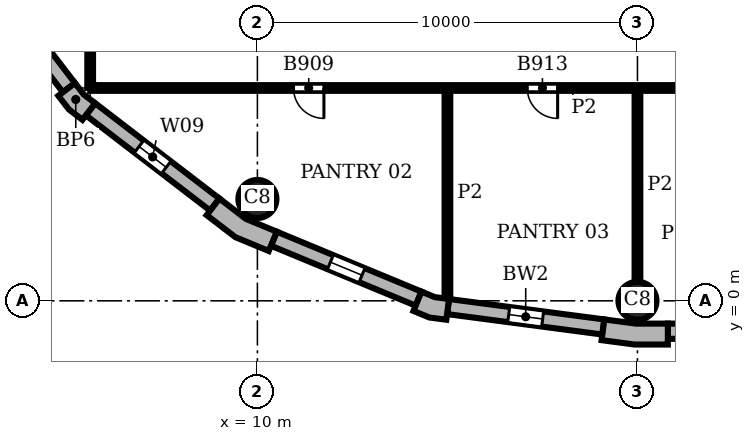
"""IFC4 building model, lengths in metres.
Left out: names, types, materials, properties, quantities, classifications, styles, units other than length and angle.
Written with IfcOpenShell. Run it as: python <this file> out.ifc"""

import sys

from ifc_helpers import new_model, si_unit, direction, frame, frame_2d, origin, origin_2d, place, context, subcontext, project, spatial, polyline, rectangle, circle, outline, extrude, element, fill, save


model = new_model("IFC4")
c1 = context("Model", 3, precision=1e-05, world=origin(), true_north=direction((0.0, 1.0)))
c2 = subcontext(c1, "Body", "Model", "MODEL_VIEW")
j1 = project(units=[si_unit("LENGTHUNIT", "METRE"), si_unit("PLANEANGLEUNIT", "RADIAN")], contexts=[c1])
p1 = place(None, origin())
s1 = spatial("IfcSite", under=j1, at=p1, CompositionType="ELEMENT")
p2 = place(p1, origin())
s2 = spatial("IfcBuilding", under=s1, at=p2, CompositionType="ELEMENT")
p3 = place(p2, frame((0.0, 0.0, 233.1)))
s3 = spatial("IfcBuildingStorey", under=s2, at=p3, CompositionType="ELEMENT", Elevation=233.1)
for number, where, z_axis, x_axis in (
    (1, (20.0, 0.0, 0.0), (0.0, 0.0, 1.0), (1.0, 0.0, 0.0)),
    (2, (10.0, 2.679, 0.0), (0.0, 0.0, 1.0), (1.0, 0.0, 0.0)),
):
    element("IfcColumn", number, at=place(p3, frame(where, z_axis=z_axis, x_axis=x_axis)), inside=s3, PredefinedType="COLUMN", context=c2, shape_type="SweptSolid", body=[
        extrude(circle(Radius=0.5, at=origin_2d()), origin(), (0.0, 0.0, 1.0), 3.9),
    ])
p4 = place(p3, origin())
e3 = element("IfcWall", 3, at=p4, inside=s3, PredefinedType="SOLIDWALL", context=c2, shape_type="SweptSolid", body=[
    extrude(outline(polyline([(19.076, -0.887), (19.057, -1.036), (19.925, -1.15), (20.8, -1.15), (20.8, -1.0), (20.8, -0.6), (19.961, -0.6), (19.128, -0.49), (19.076, -0.887)])), origin(), (0.0, 0.0, 1.0), 3.9),
])
e4 = element("IfcWall", 4, at=p4, inside=s3, PredefinedType="SOLIDWALL", context=c2, shape_type="SweptSolid", body=[
    extrude(outline(polyline([(4.882, 5.487), (4.763, 5.396), (5.038, 5.038), (5.396, 4.763), (5.487, 4.882), (5.731, 5.199), (5.43, 5.43), (5.199, 5.731), (4.882, 5.487)])), origin(), (0.0, 0.0, 1.0), 3.9),
])
e5 = element("IfcWall", 5, at=p4, inside=s3, PredefinedType="SOLIDWALL", context=c2, shape_type="SweptSolid", body=[
    extrude(outline(polyline([(8.757, 2.373), (8.665, 2.254), (9.42, 1.675), (10.299, 1.311), (10.356, 1.449), (10.51, 1.819), (9.698, 2.155), (9.0, 2.69), (8.757, 2.373)])), origin(), (0.0, 0.0, 1.0), 3.9),
])
e6 = element("IfcWall", 6, at=p4, inside=s3, PredefinedType="SOLIDWALL", context=c2, shape_type="SweptSolid", body=[
    extrude(outline(polyline([(14.164, -0.128), (14.106, -0.266), (14.523, -0.439), (14.971, -0.498), (14.99, -0.349), (15.043, 0.047), (14.667, 0.097), (14.317, 0.242), (14.164, -0.128)])), origin(), (0.0, 0.0, 1.0), 3.9),
])
p5 = place(p3, frame((20.8, -0.8, 0.0), z_axis=(0.0, 0.0, 1.0), x_axis=(1.0, 0.0, 0.0)))
e7 = element("IfcWall", 7, at=p5, inside=s3, PredefinedType="SOLIDWALL", context=c2, shape_type="SweptSolid", body=[
    extrude(rectangle(XDim=38.4, YDim=0.4, at=frame_2d((19.2, 0.0))), origin(), (0.0, 0.0, 1.0), 3.9),
])
p6 = place(p5, frame((3.75, 0.0, 0.9)))
e8 = element("IfcOpeningElement", 8, at=p6, cuts=e7, PredefinedType="OPENING", context=c2, shape_type="SweptSolid", body=[
    extrude(rectangle(XDim=0.9, YDim=2.35, at=frame_2d((0.45, 1.175))), frame((0.0, 0.21, 0.0), z_axis=(0.0, -1.0, 0.0), x_axis=(1.0, 0.0, 0.0)), (0.0, 0.0, 1.0), 0.42),
])
p7 = place(p5, frame((13.75, 0.0, 0.9)))
e9 = element("IfcOpeningElement", 9, at=p7, cuts=e7, PredefinedType="OPENING", context=c2, shape_type="SweptSolid", body=[
    extrude(rectangle(XDim=0.9, YDim=2.35, at=frame_2d((0.45, 1.175))), frame((0.0, 0.21, 0.0), z_axis=(0.0, -1.0, 0.0), x_axis=(1.0, 0.0, 0.0)), (0.0, 0.0, 1.0), 0.42),
])
p8 = place(p5, frame((23.75, 0.0, 0.9)))
e10 = element("IfcOpeningElement", 10, at=p8, cuts=e7, PredefinedType="OPENING", context=c2, shape_type="SweptSolid", body=[
    extrude(rectangle(XDim=0.9, YDim=2.35, at=frame_2d((0.45, 1.175))), frame((0.0, 0.21, 0.0), z_axis=(0.0, -1.0, 0.0), x_axis=(1.0, 0.0, 0.0)), (0.0, 0.0, 1.0), 0.42),
])
p9 = place(p5, frame((33.75, 0.0, 0.9)))
e11 = element("IfcOpeningElement", 11, at=p9, cuts=e7, PredefinedType="OPENING", context=c2, shape_type="SweptSolid", body=[
    extrude(rectangle(XDim=0.9, YDim=2.35, at=frame_2d((0.45, 1.175))), frame((0.0, 0.21, 0.0), z_axis=(0.0, -1.0, 0.0), x_axis=(1.0, 0.0, 0.0)), (0.0, 0.0, 1.0), 0.42),
])
p10 = place(p3, frame((2.532, 8.878, 0.0), z_axis=(0.0, 0.0, 1.0), x_axis=(0.608759824817, -0.793354571229, 0.0)))
e12 = element("IfcWall", 12, at=p10, inside=s3, PredefinedType="SOLIDWALL", context=c2, shape_type="SweptSolid", body=[
    extrude(rectangle(XDim=4.121, YDim=0.4, at=frame_2d((2.061, 0.0))), origin(), (0.0, 0.0, 1.0), 3.9),
])
p11 = place(p10, frame((1.611, 0.0, 0.9)))
e13 = element("IfcOpeningElement", 13, at=p11, cuts=e12, PredefinedType="OPENING", context=c2, shape_type="SweptSolid", body=[
    extrude(rectangle(XDim=0.9, YDim=2.35, at=frame_2d((0.45, 1.175))), frame((0.0, 0.21, 0.0), z_axis=(0.0, -1.0, 0.0), x_axis=(1.0, 0.0, 0.0)), (0.0, 0.0, 1.0), 0.42),
])
p12 = place(p3, frame((5.609, 5.041, 0.0), z_axis=(0.0, 0.0, 1.0), x_axis=(0.793354571229, -0.608759824817, 0.0)))
e14 = element("IfcWall", 14, at=p12, inside=s3, PredefinedType="SOLIDWALL", context=c2, shape_type="SweptSolid", body=[
    extrude(rectangle(XDim=4.121, YDim=0.4, at=frame_2d((2.061, 0.0))), origin(), (0.0, 0.0, 1.0), 3.9),
])
p13 = place(p12, frame((1.611, 0.0, 0.9)))
e15 = element("IfcOpeningElement", 15, at=p13, cuts=e14, PredefinedType="OPENING", context=c2, shape_type="SweptSolid", body=[
    extrude(rectangle(XDim=0.9, YDim=2.35, at=frame_2d((0.45, 1.175))), frame((0.0, 0.21, 0.0), z_axis=(0.0, -1.0, 0.0), x_axis=(1.0, 0.0, 0.0)), (0.0, 0.0, 1.0), 0.42),
])
p14 = place(p3, frame((10.433, 1.634, 0.0), z_axis=(0.0, 0.0, 1.0), x_axis=(0.923863744394, -0.382721546029, 0.0)))
e16 = element("IfcWall", 16, at=p14, inside=s3, PredefinedType="SOLIDWALL", context=c2, shape_type="SweptSolid", body=[
    extrude(rectangle(XDim=4.121, YDim=0.4, at=frame_2d((2.061, 0.0))), origin(), (0.0, 0.0, 1.0), 3.9),
])
p15 = place(p14, frame((1.611, 0.0, 0.9)))
e17 = element("IfcOpeningElement", 17, at=p15, cuts=e16, PredefinedType="OPENING", context=c2, shape_type="SweptSolid", body=[
    extrude(rectangle(XDim=0.9, YDim=2.35, at=frame_2d((0.45, 1.175))), frame((0.0, 0.21, 0.0), z_axis=(0.0, -1.0, 0.0), x_axis=(1.0, 0.0, 0.0)), (0.0, 0.0, 1.0), 0.42),
])
p16 = place(p3, frame((15.017, -0.151, 0.0), z_axis=(0.0, 0.0, 1.0), x_axis=(0.991446429508, -0.130514280502, 0.0)))
e18 = element("IfcWall", 18, at=p16, inside=s3, PredefinedType="SOLIDWALL", context=c2, shape_type="SweptSolid", body=[
    extrude(rectangle(XDim=4.121, YDim=0.4, at=frame_2d((2.061, 0.0))), origin(), (0.0, 0.0, 1.0), 3.9),
])
p17 = place(p16, frame((1.611, 0.0, 0.9)))
e19 = element("IfcOpeningElement", 19, at=p17, cuts=e18, PredefinedType="OPENING", context=c2, shape_type="SweptSolid", body=[
    extrude(rectangle(XDim=0.9, YDim=2.35, at=frame_2d((0.45, 1.175))), frame((0.0, 0.21, 0.0), z_axis=(0.0, -1.0, 0.0), x_axis=(1.0, 0.0, 0.0)), (0.0, 0.0, 1.0), 0.42),
])
p18 = place(p3, frame((5.6, 5.6, 0.0), z_axis=(0.0, 0.0, 1.0), x_axis=(0.0, 1.0, 0.0)))
e20 = element("IfcWall", 20, at=p18, inside=s3, PredefinedType="PARTITIONING", context=c2, shape_type="SweptSolid", body=[
    extrude(rectangle(XDim=22.4, YDim=0.15, at=frame_2d((11.2, 0.0))), origin(), (0.0, 0.0, 1.0), 3.45),
])
p19 = place(p18, frame((5.35, 0.0, 0.0)))
e21 = element("IfcOpeningElement", 21, at=p19, cuts=e20, PredefinedType="OPENING", context=c2, shape_type="SweptSolid", body=[
    extrude(rectangle(XDim=0.8, YDim=2.1, at=frame_2d((0.4, 1.05))), frame((0.0, 0.085, 0.0), z_axis=(0.0, -1.0, 0.0), x_axis=(1.0, 0.0, 0.0)), (0.0, 0.0, 1.0), 0.17),
])
p20 = place(p18, frame((11.5, 0.0, 0.0)))
e22 = element("IfcOpeningElement", 22, at=p20, cuts=e20, PredefinedType="OPENING", context=c2, shape_type="SweptSolid", body=[
    extrude(rectangle(XDim=0.8, YDim=2.1, at=frame_2d((0.4, 1.05))), frame((0.0, 0.085, 0.0), z_axis=(0.0, -1.0, 0.0), x_axis=(1.0, 0.0, 0.0)), (0.0, 0.0, 1.0), 0.17),
])
p21 = place(p18, frame((17.75, 0.0, 0.0)))
e23 = element("IfcOpeningElement", 23, at=p21, cuts=e20, PredefinedType="OPENING", context=c2, shape_type="SweptSolid", body=[
    extrude(rectangle(XDim=1.8, YDim=2.1, at=frame_2d((0.9, 1.05))), frame((0.0, 0.085, 0.0), z_axis=(0.0, -1.0, 0.0), x_axis=(1.0, 0.0, 0.0)), (0.0, 0.0, 1.0), 0.17),
])
p22 = place(p3, frame((15.0, 0.063, 0.0), z_axis=(0.0, 0.0, 1.0), x_axis=(0.0, 1.0, 0.0)))
e24 = element("IfcWall", 24, at=p22, inside=s3, PredefinedType="PARTITIONING", context=c2, shape_type="SweptSolid", body=[
    extrude(rectangle(XDim=5.537, YDim=0.15, at=frame_2d((2.769, 0.0))), origin(), (0.0, 0.0, 1.0), 3.45),
])
p23 = place(p3, frame((20.0, 0.5, 0.0), z_axis=(0.0, 0.0, 1.0), x_axis=(0.0, 1.0, 0.0)))
e25 = element("IfcWall", 25, at=p23, inside=s3, PredefinedType="PARTITIONING", context=c2, shape_type="SweptSolid", body=[
    extrude(rectangle(XDim=5.1, YDim=0.15, at=frame_2d((2.55, 0.0))), origin(), (0.0, 0.0, 1.0), 3.45),
])
p24 = place(p3, frame((5.6, 5.6, 0.0), z_axis=(0.0, 0.0, 1.0), x_axis=(1.0, 0.0, 0.0)))
e26 = element("IfcWall", 26, at=p24, inside=s3, PredefinedType="PARTITIONING", context=c2, shape_type="SweptSolid", body=[
    extrude(rectangle(XDim=25.4, YDim=0.15, at=frame_2d((12.7, 0.0))), origin(), (0.0, 0.0, 1.0), 3.45),
])
p25 = place(p24, frame((20.75, 0.0, 0.0)))
e27 = element("IfcOpeningElement", 27, at=p25, cuts=e26, PredefinedType="OPENING", context=c2, shape_type="SweptSolid", body=[
    extrude(rectangle(XDim=1.0, YDim=2.1, at=frame_2d((0.5, 1.05))), frame((0.0, 0.085, 0.0), z_axis=(0.0, -1.0, 0.0), x_axis=(1.0, 0.0, 0.0)), (0.0, 0.0, 1.0), 0.17),
])
p26 = place(p24, frame((5.35, 0.0, 0.0)))
e28 = element("IfcOpeningElement", 28, at=p26, cuts=e26, PredefinedType="OPENING", context=c2, shape_type="SweptSolid", body=[
    extrude(rectangle(XDim=0.8, YDim=2.1, at=frame_2d((0.4, 1.05))), frame((0.0, 0.085, 0.0), z_axis=(0.0, -1.0, 0.0), x_axis=(1.0, 0.0, 0.0)), (0.0, 0.0, 1.0), 0.17),
])
p27 = place(p24, frame((11.5, 0.0, 0.0)))
e29 = element("IfcOpeningElement", 29, at=p27, cuts=e26, PredefinedType="OPENING", context=c2, shape_type="SweptSolid", body=[
    extrude(rectangle(XDim=0.8, YDim=2.1, at=frame_2d((0.4, 1.05))), frame((0.0, 0.085, 0.0), z_axis=(0.0, -1.0, 0.0), x_axis=(1.0, 0.0, 0.0)), (0.0, 0.0, 1.0), 0.17),
])
p28 = place(p13, origin())
e30 = element("IfcWindow", 30, at=p28, inside=s3, PartitioningType="SINGLE_PANEL", PredefinedType="WINDOW", context=c2, shape_type="SweptSolid", body=[
    extrude(rectangle(XDim=0.9, YDim=2.35, at=frame_2d((0.45, 1.175))), frame((0.0, 0.16, 0.0), z_axis=(0.0, -1.0, 0.0), x_axis=(1.0, 0.0, 0.0)), (0.0, 0.0, 1.0), 0.06),
])
fill(e15, e30)
p29 = place(p15, origin())
e31 = element("IfcWindow", 31, at=p29, inside=s3, PartitioningType="SINGLE_PANEL", PredefinedType="WINDOW", context=c2, shape_type="SweptSolid", body=[
    extrude(rectangle(XDim=0.9, YDim=2.35, at=frame_2d((0.45, 1.175))), frame((0.0, 0.16, 0.0), z_axis=(0.0, -1.0, 0.0), x_axis=(1.0, 0.0, 0.0)), (0.0, 0.0, 1.0), 0.06),
])
fill(e17, e31)
p30 = place(p17, origin())
e32 = element("IfcWindow", 32, at=p30, inside=s3, PartitioningType="SINGLE_PANEL", PredefinedType="WINDOW", context=c2, shape_type="SweptSolid", body=[
    extrude(rectangle(XDim=0.9, YDim=2.35, at=frame_2d((0.45, 1.175))), frame((0.0, 0.16, 0.0), z_axis=(0.0, -1.0, 0.0), x_axis=(1.0, 0.0, 0.0)), (0.0, 0.0, 1.0), 0.06),
])
fill(e19, e32)
p31 = place(p26, frame((0.8, 0.0, 0.0), z_axis=(0.0, 0.0, 1.0), x_axis=(-1.0, 0.0, 0.0)))
e33 = element("IfcDoor", 33, at=p31, inside=s3, OperationType="SINGLE_SWING_LEFT", PredefinedType="DOOR", context=c2, shape_type="SweptSolid", body=[
    extrude(rectangle(XDim=0.8, YDim=2.1, at=frame_2d((0.4, 1.05))), frame((0.0, 0.025, 0.0), z_axis=(0.0, -1.0, 0.0), x_axis=(1.0, 0.0, 0.0)), (0.0, 0.0, 1.0), 0.05),
])
fill(e28, e33)
p32 = place(p27, frame((0.8, 0.0, 0.0), z_axis=(0.0, 0.0, 1.0), x_axis=(-1.0, 0.0, 0.0)))
e34 = element("IfcDoor", 34, at=p32, inside=s3, OperationType="SINGLE_SWING_LEFT", PredefinedType="DOOR", context=c2, shape_type="SweptSolid", body=[
    extrude(rectangle(XDim=0.8, YDim=2.1, at=frame_2d((0.4, 1.05))), frame((0.0, 0.025, 0.0), z_axis=(0.0, -1.0, 0.0), x_axis=(1.0, 0.0, 0.0)), (0.0, 0.0, 1.0), 0.05),
])
fill(e29, e34)
save(model, sys.argv[1])
